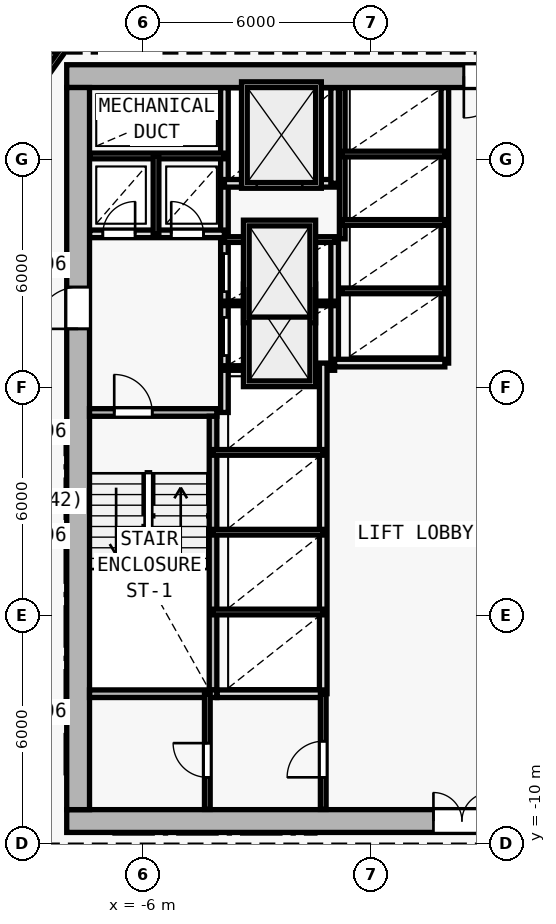
"""IFC4 building model, lengths in metres.
Left out: names, types, materials, properties, quantities, classifications, styles, units other than length and angle.
Written with IfcOpenShell. Run it as: python <this file> out.ifc"""

import sys

from ifc_helpers import new_model, si_unit, direction, frame, frame_2d, origin, origin_2d, place, context, subcontext, project, spatial, rectangle, i_section, extrude, element, fill, save


model = new_model("IFC4")
c1 = context("Model", 3, precision=1e-05, world=origin(), true_north=direction((0.0, 1.0)))
c2 = subcontext(c1, "Body", "Model", "MODEL_VIEW")
j1 = project(units=[si_unit("LENGTHUNIT", "METRE"), si_unit("PLANEANGLEUNIT", "RADIAN")], contexts=[c1])
p1 = place(None, origin())
s1 = spatial("IfcSite", under=j1, at=p1, CompositionType="ELEMENT")
p2 = place(p1, origin())
s2 = spatial("IfcBuilding", under=s1, at=p2, CompositionType="ELEMENT")
p3 = place(p2, frame((0.0, 0.0, 30.0)))
s3 = spatial("IfcBuildingStorey", under=s2, at=p3, CompositionType="ELEMENT", Elevation=30.0)
for number, where, z_axis, x_axis in (
    (1, (-7.7, -9.4, 0.0), (0.0, 0.0, 1.0), (1.0, 0.0, 0.0)),
    (2, (-7.7, 10.2, 0.0), (0.0, 0.0, 1.0), (1.0, 0.0, 0.0)),
    (3, (0.0, -9.4, 0.0), (0.0, 0.0, 1.0), (1.0, 0.0, 0.0)),
    (4, (-7.7, 2.0, 0.0), (0.0, 0.0, 1.0), (1.0, 0.0, 0.0)),
):
    element("IfcColumn", number, at=place(p3, frame(where, z_axis=z_axis, x_axis=x_axis)), inside=s3, PredefinedType="COLUMN", context=c2, shape_type="SweptSolid", body=[
        extrude(i_section(OverallWidth=0.416, OverallDepth=0.446, WebThickness=0.025, FlangeThickness=0.04, FilletRadius=0.015, at=origin_2d()), origin(), (0.0, 0.0, 1.0), 3.6),
    ])
p4 = place(p3, frame((-8.0, -9.4, 0.0), z_axis=(0.0, 0.0, 1.0), x_axis=(1.0, 0.0, 0.0)))
e5 = element("IfcWall", 5, at=p4, inside=s3, PredefinedType="SHEAR", context=c2, shape_type="SweptSolid", body=[
    extrude(rectangle(XDim=16.0, YDim=0.6, at=frame_2d((8.0, 0.0))), origin(), (0.0, 0.0, 1.0), 3.35),
])
p5 = place(p4, frame((9.65, 0.0, 0.0)))
e6 = element("IfcOpeningElement", 6, at=p5, cuts=e5, PredefinedType="OPENING", context=c2, shape_type="SweptSolid", body=[
    extrude(rectangle(XDim=1.5, YDim=2.2, at=frame_2d((0.75, 1.1))), frame((0.0, 0.31, 0.0), z_axis=(0.0, -1.0, 0.0), x_axis=(1.0, 0.0, 0.0)), (0.0, 0.0, 1.0), 0.62),
])
p6 = place(p3, frame((8.0, 10.2, 0.0), z_axis=(0.0, 0.0, 1.0), x_axis=(-1.0, 0.0, 0.0)))
e7 = element("IfcWall", 7, at=p6, inside=s3, PredefinedType="SHEAR", context=c2, shape_type="SweptSolid", body=[
    extrude(rectangle(XDim=16.0, YDim=0.6, at=frame_2d((8.0, 0.0))), origin(), (0.0, 0.0, 1.0), 3.35),
])
p7 = place(p6, frame((4.45, 0.0, 0.0)))
e8 = element("IfcOpeningElement", 8, at=p7, cuts=e7, PredefinedType="OPENING", context=c2, shape_type="SweptSolid", body=[
    extrude(rectangle(XDim=1.1, YDim=2.15, at=frame_2d((0.55, 1.075))), frame((0.0, 0.31, 0.0), z_axis=(0.0, -1.0, 0.0), x_axis=(1.0, 0.0, 0.0)), (0.0, 0.0, 1.0), 0.62),
])
p8 = place(p3, frame((-7.7, -9.1, 0.0), z_axis=(0.0, 0.0, 1.0), x_axis=(0.0, 1.0, 0.0)))
e9 = element("IfcWall", 9, at=p8, inside=s3, PredefinedType="SHEAR", context=c2, shape_type="SweptSolid", body=[
    extrude(rectangle(XDim=19.0, YDim=0.6, at=frame_2d((9.5, 0.0))), origin(), (0.0, 0.0, 1.0), 3.35),
])
p9 = place(p8, frame((12.65, 0.0, 0.0)))
e10 = element("IfcOpeningElement", 10, at=p9, cuts=e9, PredefinedType="OPENING", context=c2, shape_type="SweptSolid", body=[
    extrude(rectangle(XDim=1.1, YDim=2.15, at=frame_2d((0.55, 1.075))), frame((0.0, 0.31, 0.0), z_axis=(0.0, -1.0, 0.0), x_axis=(1.0, 0.0, 0.0)), (0.0, 0.0, 1.0), 0.62),
])
p10 = place(p3, frame((-7.4, 1.35, 0.0), z_axis=(0.0, 0.0, 1.0), x_axis=(1.0, 0.0, 0.0)))
e11 = element("IfcWall", 11, at=p10, inside=s3, PredefinedType="SOLIDWALL", context=c2, shape_type="SweptSolid", body=[
    extrude(rectangle(XDim=3.35, YDim=0.2, at=frame_2d((1.675, 0.0))), origin(), (0.0, 0.0, 1.0), 3.35),
])
p11 = place(p10, frame((0.65, 0.0, 0.0)))
e12 = element("IfcOpeningElement", 12, at=p11, cuts=e11, PredefinedType="OPENING", context=c2, shape_type="SweptSolid", body=[
    extrude(rectangle(XDim=1.0, YDim=2.15, at=frame_2d((0.5, 1.075))), frame((0.0, 0.11, 0.0), z_axis=(0.0, -1.0, 0.0), x_axis=(1.0, 0.0, 0.0)), (0.0, 0.0, 1.0), 0.22),
])
p12 = place(p3, frame((-4.15, -5.95, 0.0), z_axis=(0.0, 0.0, 1.0), x_axis=(0.0, 1.0, 0.0)))
e13 = element("IfcWall", 13, at=p12, inside=s3, PredefinedType="SOLIDWALL", context=c2, shape_type="SweptSolid", body=[
    extrude(rectangle(XDim=7.2, YDim=0.2, at=frame_2d((3.6, 0.0))), origin(), (0.0, 0.0, 1.0), 3.35),
])
p13 = place(p3, frame((-3.85, 1.35, 0.0), z_axis=(0.0, 0.0, 1.0), x_axis=(0.0, 1.0, 0.0)))
e14 = element("IfcWall", 14, at=p13, inside=s3, PredefinedType="SOLIDWALL", context=c2, shape_type="SweptSolid", body=[
    extrude(rectangle(XDim=8.545, YDim=0.2, at=frame_2d((4.272, 0.0))), origin(), (0.0, 0.0, 1.0), 3.35),
])
p14 = place(p13, frame((1.5, 0.0, 0.0)))
e15 = element("IfcOpeningElement", 15, at=p14, cuts=e14, PredefinedType="OPENING", context=c2, shape_type="SweptSolid", body=[
    extrude(rectangle(XDim=1.0, YDim=2.15, at=frame_2d((0.5, 1.075))), frame((0.0, 0.11, 0.0), z_axis=(0.0, -1.0, 0.0), x_axis=(1.0, 0.0, 0.0)), (0.0, 0.0, 1.0), 0.22),
])
p15 = place(p13, frame((3.18, 0.0, 0.0)))
e16 = element("IfcOpeningElement", 16, at=p15, cuts=e14, PredefinedType="OPENING", context=c2, shape_type="SweptSolid", body=[
    extrude(rectangle(XDim=1.0, YDim=2.15, at=frame_2d((0.5, 1.075))), frame((0.0, 0.11, 0.0), z_axis=(0.0, -1.0, 0.0), x_axis=(1.0, 0.0, 0.0)), (0.0, 0.0, 1.0), 0.22),
])
p16 = place(p3, frame((-7.395, 6.05, 0.0), z_axis=(0.0, 0.0, 1.0), x_axis=(1.0, 0.0, 0.0)))
e17 = element("IfcWall", 17, at=p16, inside=s3, PredefinedType="SOLIDWALL", context=c2, shape_type="SweptSolid", body=[
    extrude(rectangle(XDim=3.545, YDim=0.2, at=frame_2d((1.772, 0.0))), origin(), (0.0, 0.0, 1.0), 3.35),
])
p17 = place(p16, frame((0.345, 0.0, 0.0)))
e18 = element("IfcOpeningElement", 18, at=p17, cuts=e17, PredefinedType="OPENING", context=c2, shape_type="SweptSolid", body=[
    extrude(rectangle(XDim=0.85, YDim=2.1, at=frame_2d((0.425, 1.05))), frame((0.0, 0.11, 0.0), z_axis=(0.0, -1.0, 0.0), x_axis=(1.0, 0.0, 0.0)), (0.0, 0.0, 1.0), 0.22),
])
p18 = place(p16, frame((2.145, 0.0, 0.0)))
e19 = element("IfcOpeningElement", 19, at=p18, cuts=e17, PredefinedType="OPENING", context=c2, shape_type="SweptSolid", body=[
    extrude(rectangle(XDim=0.85, YDim=2.1, at=frame_2d((0.425, 1.05))), frame((0.0, 0.11, 0.0), z_axis=(0.0, -1.0, 0.0), x_axis=(1.0, 0.0, 0.0)), (0.0, 0.0, 1.0), 0.22),
])
p19 = place(p3, frame((-7.395, 8.1, 0.0), z_axis=(0.0, 0.0, 1.0), x_axis=(1.0, 0.0, 0.0)))
e20 = element("IfcWall", 20, at=p19, inside=s3, PredefinedType="PARTITIONING", context=c2, shape_type="SweptSolid", body=[
    extrude(rectangle(XDim=3.545, YDim=0.15, at=frame_2d((1.772, 0.0))), origin(), (0.0, 0.0, 1.0), 3.35),
])
p20 = place(p3, frame((-5.65, 6.05, 0.0), z_axis=(0.0, 0.0, 1.0), x_axis=(0.0, 1.0, 0.0)))
e21 = element("IfcWall", 21, at=p20, inside=s3, PredefinedType="PARTITIONING", context=c2, shape_type="SweptSolid", body=[
    extrude(rectangle(XDim=2.05, YDim=0.15, at=frame_2d((1.025, 0.0))), origin(), (0.0, 0.0, 1.0), 3.35),
])
p21 = place(p3, frame((-0.95, 2.65, 0.0), z_axis=(0.0, 0.0, 1.0), x_axis=(0.0, 1.0, 0.0)))
e22 = element("IfcWall", 22, at=p21, inside=s3, PredefinedType="SOLIDWALL", context=c2, shape_type="SweptSolid", body=[
    extrude(rectangle(XDim=3.27, YDim=0.2, at=frame_2d((1.635, 0.0))), origin(), (0.0, 0.0, 1.0), 3.35),
])
for number, where, z_axis, x_axis in (
    (23, (-3.85, 2.52, 0.0), (0.0, 0.0, 1.0), (1.0, 0.0, 0.0)),
    (24, (-3.85, 4.22, 0.0), (0.0, 0.0, 1.0), (1.0, 0.0, 0.0)),
):
    element("IfcWall", number, at=place(p3, frame(where, z_axis=z_axis, x_axis=x_axis)), inside=s3, PredefinedType="PARTITIONING", context=c2, shape_type="SweptSolid", body=[
        extrude(rectangle(XDim=2.9, YDim=0.12, at=frame_2d((1.45, 0.0))), origin(), (0.0, 0.0, 1.0), 3.35),
    ])
p22 = place(p3, frame((-3.85, 5.9, 0.0), z_axis=(0.0, 0.0, 1.0), x_axis=(1.0, 0.0, 0.0)))
e25 = element("IfcWall", 25, at=p22, inside=s3, PredefinedType="PARTITIONING", context=c2, shape_type="SweptSolid", body=[
    extrude(rectangle(XDim=2.9, YDim=0.15, at=frame_2d((1.45, 0.0))), origin(), (0.0, 0.0, 1.0), 3.35),
])
p23 = place(p3, frame((-3.85, 7.38, 0.0), z_axis=(0.0, 0.0, 1.0), x_axis=(1.0, 0.0, 0.0)))
e26 = element("IfcWall", 26, at=p23, inside=s3, PredefinedType="SOLIDWALL", context=c2, shape_type="SweptSolid", body=[
    extrude(rectangle(XDim=2.9, YDim=0.2, at=frame_2d((1.45, 0.0))), origin(), (0.0, 0.0, 1.0), 3.35),
])
p24 = place(p23, frame((0.85, 0.0, 0.0)))
e27 = element("IfcOpeningElement", 27, at=p24, cuts=e26, PredefinedType="OPENING", context=c2, shape_type="SweptSolid", body=[
    extrude(rectangle(XDim=1.2, YDim=2.2, at=frame_2d((0.6, 1.1))), frame((0.0, 0.11, 0.0), z_axis=(0.0, -1.0, 0.0), x_axis=(1.0, 0.0, 0.0)), (0.0, 0.0, 1.0), 0.22),
])
p25 = place(p3, frame((-0.95, 7.38, 0.0), z_axis=(0.0, 0.0, 1.0), x_axis=(0.0, 1.0, 0.0)))
e28 = element("IfcWall", 28, at=p25, inside=s3, PredefinedType="SOLIDWALL", context=c2, shape_type="SweptSolid", body=[
    extrude(rectangle(XDim=2.515, YDim=0.2, at=frame_2d((1.258, 0.0))), origin(), (0.0, 0.0, 1.0), 3.35),
])
p26 = place(p3, frame((-1.25, -6.05, 0.0), z_axis=(0.0, 0.0, 1.0), x_axis=(0.0, 1.0, 0.0)))
e29 = element("IfcWall", 29, at=p26, inside=s3, PredefinedType="SOLIDWALL", context=c2, shape_type="SweptSolid", body=[
    extrude(rectangle(XDim=8.7, YDim=0.2, at=frame_2d((4.35, 0.0))), origin(), (0.0, 0.0, 1.0), 3.35),
])
for number, where, z_axis, x_axis in (
    (30, (-4.15, -3.9, 0.0), (0.0, 0.0, 1.0), (1.0, 0.0, 0.0)),
    (31, (-4.15, -1.8, 0.0), (0.0, 0.0, 1.0), (1.0, 0.0, 0.0)),
    (32, (-4.15, 0.3, 0.0), (0.0, 0.0, 1.0), (1.0, 0.0, 0.0)),
):
    element("IfcWall", number, at=place(p3, frame(where, z_axis=z_axis, x_axis=x_axis)), inside=s3, PredefinedType="PARTITIONING", context=c2, shape_type="SweptSolid", body=[
        extrude(rectangle(XDim=2.9, YDim=0.15, at=frame_2d((1.45, 0.0))), origin(), (0.0, 0.0, 1.0), 3.35),
    ])
p27 = place(p3, frame((1.95, 2.65, 0.0), z_axis=(0.0, 0.0, 1.0), x_axis=(0.0, 1.0, 0.0)))
e33 = element("IfcWall", 33, at=p27, inside=s3, PredefinedType="SOLIDWALL", context=c2, shape_type="SweptSolid", body=[
    extrude(rectangle(XDim=7.245, YDim=0.2, at=frame_2d((3.623, 0.0))), origin(), (0.0, 0.0, 1.0), 3.35),
])
p28 = place(p3, frame((-0.95, 2.65, 0.0), z_axis=(0.0, 0.0, 1.0), x_axis=(1.0, 0.0, 0.0)))
e34 = element("IfcWall", 34, at=p28, inside=s3, PredefinedType="SOLIDWALL", context=c2, shape_type="SweptSolid", body=[
    extrude(rectangle(XDim=2.9, YDim=0.2, at=frame_2d((1.45, 0.0))), origin(), (0.0, 0.0, 1.0), 3.35),
])
p29 = place(p3, frame((-0.75, 5.92, 0.0), z_axis=(0.0, 0.0, 1.0), x_axis=(0.0, 1.0, 0.0)))
e35 = element("IfcWall", 35, at=p29, inside=s3, PredefinedType="PARTITIONING", context=c2, shape_type="SweptSolid", body=[
    extrude(rectangle(XDim=3.975, YDim=0.15, at=frame_2d((1.988, 0.0))), origin(), (0.0, 0.0, 1.0), 3.35),
])
for number, where, z_axis, x_axis in (
    (36, (-0.75, 4.55, 0.0), (0.0, 0.0, 1.0), (1.0, 0.0, 0.0)),
    (37, (-0.75, 6.35, 0.0), (0.0, 0.0, 1.0), (1.0, 0.0, 0.0)),
    (38, (-0.75, 8.15, 0.0), (0.0, 0.0, 1.0), (1.0, 0.0, 0.0)),
):
    element("IfcWall", number, at=place(p3, frame(where, z_axis=z_axis, x_axis=x_axis)), inside=s3, PredefinedType="PARTITIONING", context=c2, shape_type="SweptSolid", body=[
        extrude(rectangle(XDim=2.7, YDim=0.15, at=frame_2d((1.35, 0.0))), origin(), (0.0, 0.0, 1.0), 3.35),
    ])
p30 = place(p3, frame((-7.4, -6.05, 0.0), z_axis=(0.0, 0.0, 1.0), x_axis=(1.0, 0.0, 0.0)))
e39 = element("IfcWall", 39, at=p30, inside=s3, PredefinedType="SOLIDWALL", context=c2, shape_type="SweptSolid", body=[
    extrude(rectangle(XDim=3.35, YDim=0.2, at=frame_2d((1.675, 0.0))), origin(), (0.0, 0.0, 1.0), 3.35),
])
p31 = place(p3, frame((-4.04, -6.05, 0.0), z_axis=(0.0, 0.0, 1.0), x_axis=(1.0, 0.0, 0.0)))
e40 = element("IfcWall", 40, at=p31, inside=s3, PredefinedType="SOLIDWALL", context=c2, shape_type="SweptSolid", body=[
    extrude(rectangle(XDim=2.79, YDim=0.2, at=frame_2d((1.395, 0.0))), origin(), (0.0, 0.0, 1.0), 3.35),
])
p32 = place(p3, frame((-1.25, -9.095, 0.0), z_axis=(0.0, 0.0, 1.0), x_axis=(0.0, 1.0, 0.0)))
e41 = element("IfcWall", 41, at=p32, inside=s3, PredefinedType="PARTITIONING", context=c2, shape_type="SweptSolid", body=[
    extrude(rectangle(XDim=3.045, YDim=0.15, at=frame_2d((1.522, 0.0))), origin(), (0.0, 0.0, 1.0), 3.35),
])
p33 = place(p32, frame((0.845, 0.0, 0.0)))
e42 = element("IfcOpeningElement", 42, at=p33, cuts=e41, PredefinedType="OPENING", context=c2, shape_type="SweptSolid", body=[
    extrude(rectangle(XDim=0.95, YDim=2.1, at=frame_2d((0.475, 1.05))), frame((0.0, 0.085, 0.0), z_axis=(0.0, -1.0, 0.0), x_axis=(1.0, 0.0, 0.0)), (0.0, 0.0, 1.0), 0.17),
])
p34 = place(p3, frame((-4.3, -9.095, 0.0), z_axis=(0.0, 0.0, 1.0), x_axis=(0.0, 1.0, 0.0)))
e43 = element("IfcWall", 43, at=p34, inside=s3, PredefinedType="PARTITIONING", context=c2, shape_type="SweptSolid", body=[
    extrude(rectangle(XDim=3.045, YDim=0.15, at=frame_2d((1.522, 0.0))), origin(), (0.0, 0.0, 1.0), 3.35),
])
p35 = place(p34, frame((0.845, 0.0, 0.0)))
e44 = element("IfcOpeningElement", 44, at=p35, cuts=e43, PredefinedType="OPENING", context=c2, shape_type="SweptSolid", body=[
    extrude(rectangle(XDim=0.9, YDim=2.1, at=frame_2d((0.45, 1.05))), frame((0.0, 0.085, 0.0), z_axis=(0.0, -1.0, 0.0), x_axis=(1.0, 0.0, 0.0)), (0.0, 0.0, 1.0), 0.17),
])
p36 = place(p3, frame((-9.86, 8.426, 0.0), z_axis=(0.0, 0.0, 1.0), x_axis=(0.582449511476, 0.812866881218, 0.0)))
e45 = element("IfcWall", 45, at=p36, inside=s3, PredefinedType="PARTITIONING", context=c2, shape_type="SweptSolid", body=[
    extrude(rectangle(XDim=4.84, YDim=0.15, at=frame_2d((2.42, 0.0))), origin(), (0.0, 0.0, 1.0), 2.725),
])
p37 = place(p36, frame((3.035, 0.0, 0.0)))
e46 = element("IfcOpeningElement", 46, at=p37, cuts=e45, PredefinedType="OPENING", context=c2, shape_type="SweptSolid", body=[
    extrude(rectangle(XDim=0.9, YDim=2.1, at=frame_2d((0.45, 1.05))), frame((0.0, 0.085, 0.0), z_axis=(0.0, -1.0, 0.0), x_axis=(1.0, 0.0, 0.0)), (0.0, 0.0, 1.0), 0.17),
])
p38 = place(p5, origin())
e47 = element("IfcDoor", 47, at=p38, inside=s3, OperationType="DOUBLE_DOOR_SINGLE_SWING", PredefinedType="DOOR", context=c2, shape_type="SweptSolid", body=[
    extrude(rectangle(XDim=1.5, YDim=2.2, at=frame_2d((0.75, 1.1))), frame((0.0, 0.025, 0.0), z_axis=(0.0, -1.0, 0.0), x_axis=(1.0, 0.0, 0.0)), (0.0, 0.0, 1.0), 0.05),
])
fill(e6, e47)
p39 = place(p9, origin())
e48 = element("IfcDoor", 48, at=p39, inside=s3, OperationType="SINGLE_SWING_LEFT", PredefinedType="DOOR", context=c2, shape_type="SweptSolid", body=[
    extrude(rectangle(XDim=1.1, YDim=2.15, at=frame_2d((0.55, 1.075))), frame((0.0, 0.025, 0.0), z_axis=(0.0, -1.0, 0.0), x_axis=(1.0, 0.0, 0.0)), (0.0, 0.0, 1.0), 0.05),
])
fill(e10, e48)
p40 = place(p7, origin())
e49 = element("IfcDoor", 49, at=p40, inside=s3, OperationType="SINGLE_SWING_RIGHT", PredefinedType="DOOR", context=c2, shape_type="SweptSolid", body=[
    extrude(rectangle(XDim=1.1, YDim=2.15, at=frame_2d((0.55, 1.075))), frame((0.0, 0.025, 0.0), z_axis=(0.0, -1.0, 0.0), x_axis=(1.0, 0.0, 0.0)), (0.0, 0.0, 1.0), 0.05),
])
fill(e8, e49)
p41 = place(p11, origin())
e50 = element("IfcDoor", 50, at=p41, inside=s3, OperationType="SINGLE_SWING_LEFT", PredefinedType="DOOR", context=c2, shape_type="SweptSolid", body=[
    extrude(rectangle(XDim=1.0, YDim=2.15, at=frame_2d((0.5, 1.075))), frame((0.0, 0.025, 0.0), z_axis=(0.0, -1.0, 0.0), x_axis=(1.0, 0.0, 0.0)), (0.0, 0.0, 1.0), 0.05),
])
fill(e12, e50)
p42 = place(p17, origin())
e51 = element("IfcDoor", 51, at=p42, inside=s3, OperationType="SINGLE_SWING_RIGHT", PredefinedType="DOOR", context=c2, shape_type="SweptSolid", body=[
    extrude(rectangle(XDim=0.85, YDim=2.1, at=frame_2d((0.425, 1.05))), frame((0.0, 0.025, 0.0), z_axis=(0.0, -1.0, 0.0), x_axis=(1.0, 0.0, 0.0)), (0.0, 0.0, 1.0), 0.05),
])
fill(e18, e51)
p43 = place(p18, origin())
e52 = element("IfcDoor", 52, at=p43, inside=s3, OperationType="SINGLE_SWING_LEFT", PredefinedType="DOOR", context=c2, shape_type="SweptSolid", body=[
    extrude(rectangle(XDim=0.85, YDim=2.1, at=frame_2d((0.425, 1.05))), frame((0.0, 0.025, 0.0), z_axis=(0.0, -1.0, 0.0), x_axis=(1.0, 0.0, 0.0)), (0.0, 0.0, 1.0), 0.05),
])
fill(e19, e52)
p44 = place(p24, origin())
e53 = element("IfcDoor", 53, at=p44, inside=s3, OperationType="DOUBLE_DOOR_SLIDING", PredefinedType="DOOR", context=c2, shape_type="SweptSolid", body=[
    extrude(rectangle(XDim=1.2, YDim=2.2, at=frame_2d((0.6, 1.1))), frame((0.0, 0.025, 0.0), z_axis=(0.0, -1.0, 0.0), x_axis=(1.0, 0.0, 0.0)), (0.0, 0.0, 1.0), 0.05),
])
fill(e27, e53)
p45 = place(p14, origin())
e54 = element("IfcDoor", 54, at=p45, inside=s3, OperationType="DOUBLE_DOOR_SLIDING", PredefinedType="DOOR", context=c2, shape_type="SweptSolid", body=[
    extrude(rectangle(XDim=1.0, YDim=2.15, at=frame_2d((0.5, 1.075))), frame((0.0, 0.025, 0.0), z_axis=(0.0, -1.0, 0.0), x_axis=(1.0, 0.0, 0.0)), (0.0, 0.0, 1.0), 0.05),
])
fill(e15, e54)
p46 = place(p15, origin())
e55 = element("IfcDoor", 55, at=p46, inside=s3, OperationType="DOUBLE_DOOR_SLIDING", PredefinedType="DOOR", context=c2, shape_type="SweptSolid", body=[
    extrude(rectangle(XDim=1.0, YDim=2.15, at=frame_2d((0.5, 1.075))), frame((0.0, 0.025, 0.0), z_axis=(0.0, -1.0, 0.0), x_axis=(1.0, 0.0, 0.0)), (0.0, 0.0, 1.0), 0.05),
])
fill(e16, e55)
p47 = place(p33, origin())
e56 = element("IfcDoor", 56, at=p47, inside=s3, OperationType="SINGLE_SWING_LEFT", PredefinedType="DOOR", context=c2, shape_type="SweptSolid", body=[
    extrude(rectangle(XDim=0.95, YDim=2.1, at=frame_2d((0.475, 1.05))), frame((0.0, 0.025, 0.0), z_axis=(0.0, -1.0, 0.0), x_axis=(1.0, 0.0, 0.0)), (0.0, 0.0, 1.0), 0.05),
])
fill(e42, e56)
p48 = place(p35, origin())
e57 = element("IfcDoor", 57, at=p48, inside=s3, OperationType="SINGLE_SWING_RIGHT", PredefinedType="DOOR", context=c2, shape_type="SweptSolid", body=[
    extrude(rectangle(XDim=0.9, YDim=2.1, at=frame_2d((0.45, 1.05))), frame((0.0, 0.025, 0.0), z_axis=(0.0, -1.0, 0.0), x_axis=(1.0, 0.0, 0.0)), (0.0, 0.0, 1.0), 0.05),
])
fill(e44, e57)
save(model, sys.argv[1])
